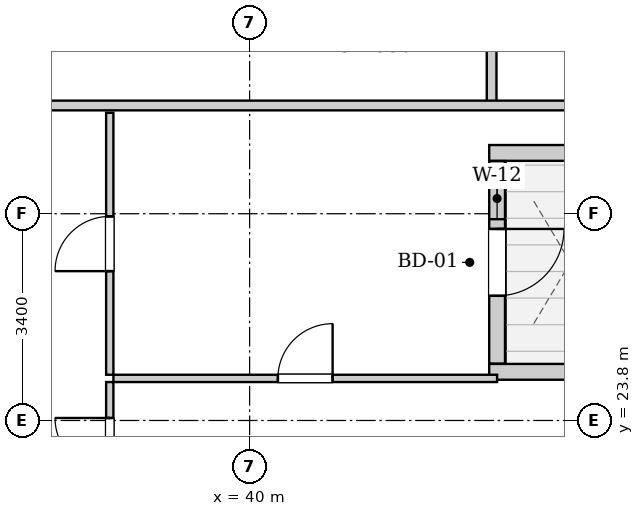
"""IFC4 building model, lengths in metres.
Left out: names, types, materials, properties, quantities, classifications, styles, units other than length and angle.
Written with IfcOpenShell. Run it as: python <this file> out.ifc"""

import sys

from ifc_helpers import new_model, si_unit, direction, frame, frame_2d, origin, place, context, subcontext, project, spatial, rectangle, extrude, element, fill, save


model = new_model("IFC4")
c1 = context("Model", 3, precision=1e-05, world=origin(), true_north=direction((0.0, 1.0)))
c2 = subcontext(c1, "Body", "Model", "MODEL_VIEW")
j1 = project(units=[si_unit("LENGTHUNIT", "METRE"), si_unit("PLANEANGLEUNIT", "RADIAN")], contexts=[c1])
p1 = place(None, origin())
s1 = spatial("IfcSite", under=j1, at=p1, CompositionType="ELEMENT")
p2 = place(p1, origin())
s2 = spatial("IfcBuilding", under=s1, at=p2, CompositionType="ELEMENT")
p3 = place(p2, frame((0.0, 0.0, 64.2)))
s3 = spatial("IfcBuildingStorey", under=s2, at=p3, CompositionType="ELEMENT", Elevation=64.2)
p4 = place(p3, frame((46.34, 28.2, 0.0), z_axis=(0.0, 0.0, 1.0), x_axis=(-1.0, 0.0, 0.0)))
e1 = element("IfcWall", 1, at=p4, inside=s3, PredefinedType="SOLIDWALL", context=c2, shape_type="SweptSolid", body=[
    extrude(rectangle(XDim=2.4, YDim=0.26, at=frame_2d((1.2, 0.0))), origin(), (0.0, 0.0, 1.0), 2.94),
])
p5 = place(p3, frame((44.07, 28.066, 0.0), z_axis=(0.0, 0.0, 1.0), x_axis=(0.0, -1.0, 0.0)))
e2 = element("IfcWall", 2, at=p5, inside=s3, PredefinedType="SOLIDWALL", context=c2, shape_type="SweptSolid", body=[
    extrude(rectangle(XDim=3.332, YDim=0.26, at=frame_2d((1.666, 0.0))), origin(), (0.0, 0.0, 1.0), 2.94),
])
p6 = place(p5, frame((1.116, 0.0, 0.0)))
e3 = element("IfcOpeningElement", 3, at=p6, cuts=e2, PredefinedType="OPENING", context=c2, shape_type="SweptSolid", body=[
    extrude(rectangle(XDim=1.1, YDim=2.0, at=frame_2d((0.55, 1.0))), frame((0.0, 0.14, 0.0), z_axis=(0.0, -1.0, 0.0), x_axis=(1.0, 0.0, 0.0)), (0.0, 0.0, 1.0), 0.28),
])
p7 = place(p5, frame((0.276, 0.0, 0.55)))
e4 = element("IfcOpeningElement", 4, at=p7, cuts=e2, PredefinedType="OPENING", context=c2, shape_type="SweptSolid", body=[
    extrude(rectangle(XDim=0.68, YDim=1.2, at=frame_2d((0.34, 0.6))), frame((0.0, 0.14, 0.0), z_axis=(0.0, -1.0, 0.0), x_axis=(1.0, 0.0, 0.0)), (0.0, 0.0, 1.0), 0.28),
])
p8 = place(p3, frame((43.94, 24.6, 0.0), z_axis=(0.0, 0.0, 1.0), x_axis=(1.0, 0.0, 0.0)))
e5 = element("IfcWall", 5, at=p8, inside=s3, PredefinedType="SOLIDWALL", context=c2, shape_type="SweptSolid", body=[
    extrude(rectangle(XDim=2.4, YDim=0.26, at=frame_2d((1.2, 0.0))), origin(), (0.0, 0.0, 1.0), 2.94),
])
p9 = place(p3, frame((43.98, 28.98, 0.0), z_axis=(0.0, 0.0, 1.0), x_axis=(0.0, 1.0, 0.0)))
e6 = element("IfcWall", 6, at=p9, inside=s3, PredefinedType="PARTITIONING", context=c2, shape_type="SweptSolid", body=[
    extrude(rectangle(XDim=1.74, YDim=0.16, at=frame_2d((0.87, 0.0))), origin(), (0.0, 0.0, 1.0), 2.94),
])
p10 = place(p3, frame((35.11, 28.98, 0.0), z_axis=(0.0, 0.0, 1.0), x_axis=(1.0, 0.0, 0.0)))
e7 = element("IfcWall", 7, at=p10, inside=s3, PredefinedType="PARTITIONING", context=c2, shape_type="SweptSolid", body=[
    extrude(rectangle(XDim=11.11, YDim=0.16, at=frame_2d((5.555, 0.0))), origin(), (0.0, 0.0, 1.0), 2.232),
])
p11 = place(p3, frame((37.7, 22.35, 0.0), z_axis=(0.0, 0.0, 1.0), x_axis=(0.0, 1.0, 0.0)))
e8 = element("IfcWall", 8, at=p11, inside=s3, PredefinedType="PARTITIONING", context=c2, shape_type="SweptSolid", body=[
    extrude(rectangle(XDim=2.082, YDim=0.12, at=frame_2d((1.041, 0.0))), origin(), (0.0, 0.0, 1.0), 2.94),
])
p12 = place(p11, frame((0.591, 0.0, 0.0)))
e9 = element("IfcOpeningElement", 9, at=p12, cuts=e8, PredefinedType="OPENING", context=c2, shape_type="SweptSolid", body=[
    extrude(rectangle(XDim=0.9, YDim=2.05, at=frame_2d((0.45, 1.025))), frame((0.0, 0.07, 0.0), z_axis=(0.0, -1.0, 0.0), x_axis=(1.0, 0.0, 0.0)), (0.0, 0.0, 1.0), 0.14),
])
p13 = place(p3, frame((37.7, 24.552, 0.0), z_axis=(0.0, 0.0, 1.0), x_axis=(0.0, 1.0, 0.0)))
e10 = element("IfcWall", 10, at=p13, inside=s3, PredefinedType="PARTITIONING", context=c2, shape_type="SweptSolid", body=[
    extrude(rectangle(XDim=4.308, YDim=0.12, at=frame_2d((2.154, 0.0))), origin(), (0.0, 0.0, 1.0), 2.94),
])
p14 = place(p13, frame((1.704, 0.0, 0.0)))
e11 = element("IfcOpeningElement", 11, at=p14, cuts=e10, PredefinedType="OPENING", context=c2, shape_type="SweptSolid", body=[
    extrude(rectangle(XDim=0.9, YDim=2.05, at=frame_2d((0.45, 1.025))), frame((0.0, 0.07, 0.0), z_axis=(0.0, -1.0, 0.0), x_axis=(1.0, 0.0, 0.0)), (0.0, 0.0, 1.0), 0.14),
])
p15 = place(p3, frame((37.76, 24.492, 0.0), z_axis=(0.0, 0.0, 1.0), x_axis=(1.0, 0.0, 0.0)))
e12 = element("IfcWall", 12, at=p15, inside=s3, PredefinedType="PARTITIONING", context=c2, shape_type="SweptSolid", body=[
    extrude(rectangle(XDim=6.31, YDim=0.12, at=frame_2d((3.155, 0.0))), origin(), (0.0, 0.0, 1.0), 2.508),
])
p16 = place(p15, frame((2.705, 0.0, 0.0)))
e13 = element("IfcOpeningElement", 13, at=p16, cuts=e12, PredefinedType="OPENING", context=c2, shape_type="SweptSolid", body=[
    extrude(rectangle(XDim=0.9, YDim=2.05, at=frame_2d((0.45, 1.025))), frame((0.0, 0.07, 0.0), z_axis=(0.0, -1.0, 0.0), x_axis=(1.0, 0.0, 0.0)), (0.0, 0.0, 1.0), 0.14),
])
p17 = place(p12, origin())
e14 = element("IfcDoor", 14, at=p17, inside=s3, OperationType="SINGLE_SWING_RIGHT", PredefinedType="DOOR", context=c2, shape_type="SweptSolid", body=[
    extrude(rectangle(XDim=0.9, YDim=2.05, at=frame_2d((0.45, 1.025))), frame((0.0, 0.025, 0.0), z_axis=(0.0, -1.0, 0.0), x_axis=(1.0, 0.0, 0.0)), (0.0, 0.0, 1.0), 0.05),
])
fill(e9, e14)
p18 = place(p14, origin())
e15 = element("IfcDoor", 15, at=p18, inside=s3, OperationType="SINGLE_SWING_LEFT", PredefinedType="DOOR", context=c2, shape_type="SweptSolid", body=[
    extrude(rectangle(XDim=0.9, YDim=2.05, at=frame_2d((0.45, 1.025))), frame((0.0, 0.025, 0.0), z_axis=(0.0, -1.0, 0.0), x_axis=(1.0, 0.0, 0.0)), (0.0, 0.0, 1.0), 0.05),
])
fill(e11, e15)
p19 = place(p16, origin())
e16 = element("IfcDoor", 16, at=p19, inside=s3, OperationType="SINGLE_SWING_RIGHT", PredefinedType="DOOR", context=c2, shape_type="SweptSolid", body=[
    extrude(rectangle(XDim=0.9, YDim=2.05, at=frame_2d((0.45, 1.025))), frame((0.0, 0.025, 0.0), z_axis=(0.0, -1.0, 0.0), x_axis=(1.0, 0.0, 0.0)), (0.0, 0.0, 1.0), 0.05),
])
fill(e13, e16)
p20 = place(p6, origin())
e17 = element("IfcDoor", 17, at=p20, inside=s3, OperationType="SINGLE_SWING_LEFT", PredefinedType="DOOR", context=c2, shape_type="SweptSolid", body=[
    extrude(rectangle(XDim=1.1, YDim=2.0, at=frame_2d((0.55, 1.0))), frame((0.0, 0.025, 0.0), z_axis=(0.0, -1.0, 0.0), x_axis=(1.0, 0.0, 0.0)), (0.0, 0.0, 1.0), 0.05),
])
fill(e3, e17)
p21 = place(p7, origin())
e18 = element("IfcWindow", 18, at=p21, inside=s3, PartitioningType="SINGLE_PANEL", PredefinedType="WINDOW", context=c2, shape_type="SweptSolid", body=[
    extrude(rectangle(XDim=0.68, YDim=1.2, at=frame_2d((0.34, 0.6))), frame((0.0, 0.03, 0.0), z_axis=(0.0, -1.0, 0.0), x_axis=(1.0, 0.0, 0.0)), (0.0, 0.0, 1.0), 0.06),
])
fill(e4, e18)
save(model, sys.argv[1])
